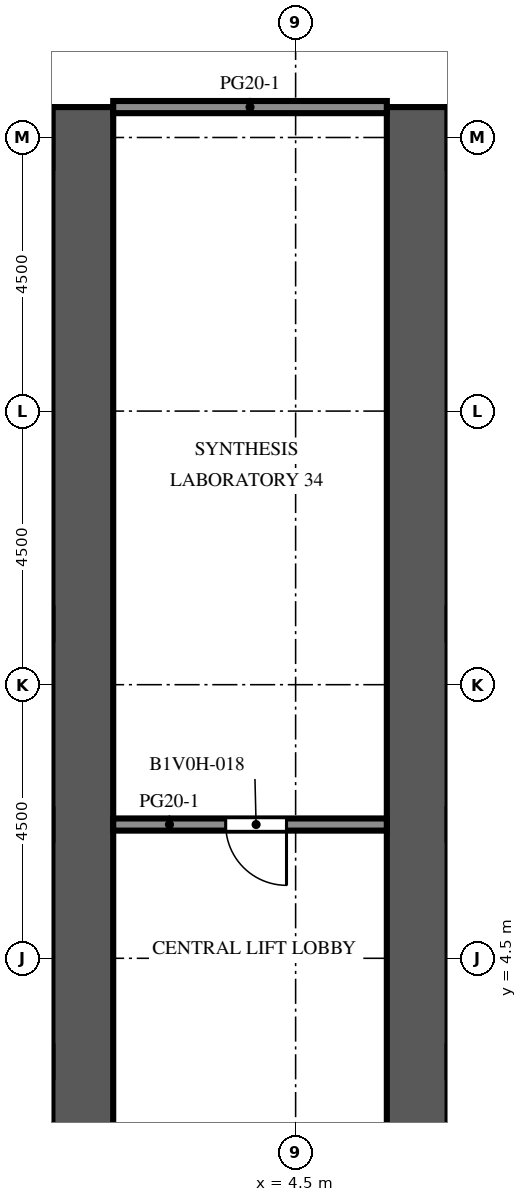
"""IFC4 building model, lengths in metres.
Left out: names, types, materials, properties, quantities, classifications, styles, units other than length and angle.
Written with IfcOpenShell. Run it as: python <this file> out.ifc"""

import sys

from ifc_helpers import new_model, si_unit, direction, frame, frame_2d, origin, place, context, subcontext, project, spatial, rectangle, extrude, element, fill, save


model = new_model("IFC4")
c1 = context("Model", 3, precision=1e-05, world=origin(), true_north=direction((0.0, 1.0)))
c2 = subcontext(c1, "Body", "Model", "MODEL_VIEW")
j1 = project(units=[si_unit("LENGTHUNIT", "METRE"), si_unit("PLANEANGLEUNIT", "RADIAN")], contexts=[c1])
p1 = place(None, origin())
s1 = spatial("IfcSite", under=j1, at=p1, CompositionType="ELEMENT")
p2 = place(p1, origin())
s2 = spatial("IfcBuilding", under=s1, at=p2, CompositionType="ELEMENT")
p3 = place(p2, frame((0.0, 0.0, 7.2)))
s3 = spatial("IfcBuildingStorey", under=s2, at=p3, CompositionType="ELEMENT", Elevation=7.2)
p4 = place(p3, frame((1.0, -9.0, 0.0), z_axis=(0.0, 0.0, 1.0), x_axis=(0.0, 1.0, 0.0)))
e1 = element("IfcWall", 1, at=p4, inside=s3, PredefinedType="SHEAR", context=c2, shape_type="SweptSolid", body=[
    extrude(rectangle(XDim=27.5, YDim=1.0, at=frame_2d((13.75, 0.0))), origin(), (0.0, 0.0, 1.0), 4.1),
])
p5 = place(p4, frame((12.55, 0.0, 0.0)))
e2 = element("IfcOpeningElement", 2, at=p5, cuts=e1, PredefinedType="OPENING", context=c2, shape_type="SweptSolid", body=[
    extrude(rectangle(XDim=2.4, YDim=2.4, at=frame_2d((1.2, 1.2))), frame((0.0, 0.51, 0.0), z_axis=(0.0, -1.0, 0.0), x_axis=(1.0, 0.0, 0.0)), (0.0, 0.0, 1.0), 1.02),
])
p6 = place(p4, frame((4.025, 0.0, 0.0)))
e3 = element("IfcOpeningElement", 3, at=p6, cuts=e1, PredefinedType="OPENING", context=c2, shape_type="SweptSolid", body=[
    extrude(rectangle(XDim=1.2, YDim=2.1, at=frame_2d((0.6, 1.05))), frame((0.0, 0.51, 0.0), z_axis=(0.0, -1.0, 0.0), x_axis=(1.0, 0.0, 0.0)), (0.0, 0.0, 1.0), 1.02),
])
p7 = place(p4, frame((22.275, 0.0, 0.0)))
e4 = element("IfcOpeningElement", 4, at=p7, cuts=e1, PredefinedType="OPENING", context=c2, shape_type="SweptSolid", body=[
    extrude(rectangle(XDim=1.2, YDim=2.1, at=frame_2d((0.6, 1.05))), frame((0.0, 0.51, 0.0), z_axis=(0.0, -1.0, 0.0), x_axis=(1.0, 0.0, 0.0)), (0.0, 0.0, 1.0), 1.02),
])
p8 = place(p3, frame((6.5, -9.0, 0.0), z_axis=(0.0, 0.0, 1.0), x_axis=(0.0, 1.0, 0.0)))
e5 = element("IfcWall", 5, at=p8, inside=s3, PredefinedType="SHEAR", context=c2, shape_type="SweptSolid", body=[
    extrude(rectangle(XDim=27.5, YDim=1.0, at=frame_2d((13.75, 0.0))), origin(), (0.0, 0.0, 1.0), 4.1),
])
p9 = place(p8, frame((12.55, 0.0, 0.0)))
e6 = element("IfcOpeningElement", 6, at=p9, cuts=e5, PredefinedType="OPENING", context=c2, shape_type="SweptSolid", body=[
    extrude(rectangle(XDim=2.4, YDim=2.4, at=frame_2d((1.2, 1.2))), frame((0.0, 0.51, 0.0), z_axis=(0.0, -1.0, 0.0), x_axis=(1.0, 0.0, 0.0)), (0.0, 0.0, 1.0), 1.02),
])
p10 = place(p8, frame((4.025, 0.0, 0.0)))
e7 = element("IfcOpeningElement", 7, at=p10, cuts=e5, PredefinedType="OPENING", context=c2, shape_type="SweptSolid", body=[
    extrude(rectangle(XDim=1.2, YDim=2.1, at=frame_2d((0.6, 1.05))), frame((0.0, 0.51, 0.0), z_axis=(0.0, -1.0, 0.0), x_axis=(1.0, 0.0, 0.0)), (0.0, 0.0, 1.0), 1.02),
])
p11 = place(p8, frame((22.275, 0.0, 0.0)))
e8 = element("IfcOpeningElement", 8, at=p11, cuts=e5, PredefinedType="OPENING", context=c2, shape_type="SweptSolid", body=[
    extrude(rectangle(XDim=1.2, YDim=2.1, at=frame_2d((0.6, 1.05))), frame((0.0, 0.51, 0.0), z_axis=(0.0, -1.0, 0.0), x_axis=(1.0, 0.0, 0.0)), (0.0, 0.0, 1.0), 1.02),
])
p12 = place(p3, frame((1.5, 6.7, 0.0), z_axis=(0.0, 0.0, 1.0), x_axis=(1.0, 0.0, 0.0)))
e9 = element("IfcWall", 9, at=p12, inside=s3, PredefinedType="PARTITIONING", context=c2, shape_type="SweptSolid", body=[
    extrude(rectangle(XDim=4.5, YDim=0.2, at=frame_2d((2.25, 0.0))), origin(), (0.0, 0.0, 1.0), 3.65),
])
p13 = place(p12, frame((1.85, 0.0, 0.0)))
e10 = element("IfcOpeningElement", 10, at=p13, cuts=e9, PredefinedType="OPENING", context=c2, shape_type="SweptSolid", body=[
    extrude(rectangle(XDim=1.0, YDim=2.1, at=frame_2d((0.5, 1.05))), frame((0.0, 0.11, 0.0), z_axis=(0.0, -1.0, 0.0), x_axis=(1.0, 0.0, 0.0)), (0.0, 0.0, 1.0), 0.22),
])
p14 = place(p3, frame((1.5, 18.5, 0.0), z_axis=(0.0, 0.0, 1.0), x_axis=(1.0, 0.0, 0.0)))
e11 = element("IfcWall", 11, at=p14, inside=s3, PredefinedType="PARTITIONING", context=c2, shape_type="SweptSolid", body=[
    extrude(rectangle(XDim=4.5, YDim=0.2, at=frame_2d((2.25, 0.0))), origin(), (0.0, 0.0, 1.0), 3.65),
])
p15 = place(p5, origin())
e12 = element("IfcDoor", 12, at=p15, inside=s3, OperationType="DOUBLE_DOOR_DOUBLE_SWING", PredefinedType="DOOR", context=c2, shape_type="SweptSolid", body=[
    extrude(rectangle(XDim=2.4, YDim=2.4, at=frame_2d((1.2, 1.2))), frame((0.0, 0.025, 0.0), z_axis=(0.0, -1.0, 0.0), x_axis=(1.0, 0.0, 0.0)), (0.0, 0.0, 1.0), 0.05),
])
fill(e2, e12)
p16 = place(p9, origin())
e13 = element("IfcDoor", 13, at=p16, inside=s3, OperationType="DOUBLE_DOOR_DOUBLE_SWING", PredefinedType="DOOR", context=c2, shape_type="SweptSolid", body=[
    extrude(rectangle(XDim=2.4, YDim=2.4, at=frame_2d((1.2, 1.2))), frame((0.0, 0.025, 0.0), z_axis=(0.0, -1.0, 0.0), x_axis=(1.0, 0.0, 0.0)), (0.0, 0.0, 1.0), 0.05),
])
fill(e6, e13)
p17 = place(p7, origin())
e14 = element("IfcDoor", 14, at=p17, inside=s3, OperationType="SINGLE_SWING_LEFT", PredefinedType="DOOR", context=c2, shape_type="SweptSolid", body=[
    extrude(rectangle(XDim=1.2, YDim=2.1, at=frame_2d((0.6, 1.05))), frame((0.0, 0.475, 0.0), z_axis=(0.0, -1.0, 0.0), x_axis=(1.0, 0.0, 0.0)), (0.0, 0.0, 1.0), 0.05),
])
fill(e4, e14)
p18 = place(p11, origin())
e15 = element("IfcDoor", 15, at=p18, inside=s3, OperationType="SINGLE_SWING_RIGHT", PredefinedType="DOOR", context=c2, shape_type="SweptSolid", body=[
    extrude(rectangle(XDim=1.2, YDim=2.1, at=frame_2d((0.6, 1.05))), frame((0.0, -0.425, 0.0), z_axis=(0.0, -1.0, 0.0), x_axis=(1.0, 0.0, 0.0)), (0.0, 0.0, 1.0), 0.05),
])
fill(e8, e15)
p19 = place(p13, origin())
e16 = element("IfcDoor", 16, at=p19, inside=s3, OperationType="SINGLE_SWING_RIGHT", PredefinedType="DOOR", context=c2, shape_type="SweptSolid", body=[
    extrude(rectangle(XDim=1.0, YDim=2.1, at=frame_2d((0.5, 1.05))), frame((0.0, 0.025, 0.0), z_axis=(0.0, -1.0, 0.0), x_axis=(1.0, 0.0, 0.0)), (0.0, 0.0, 1.0), 0.05),
])
fill(e10, e16)
save(model, sys.argv[1])
